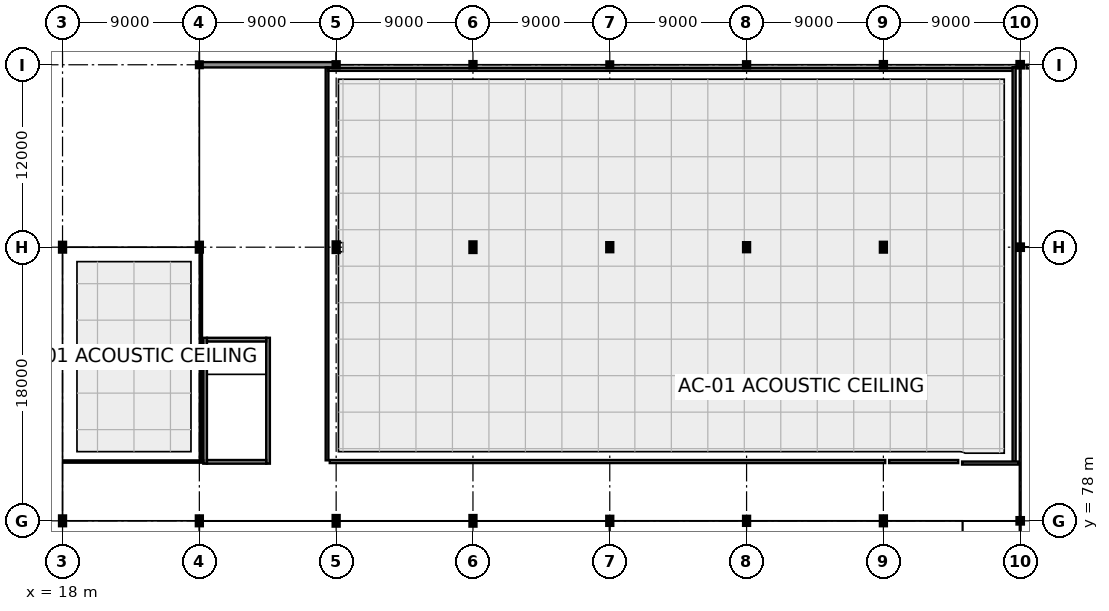
"""IFC4 building model, lengths in metres.
Left out: names, types, materials, properties, quantities, classifications, styles, units other than length and angle.
Written with IfcOpenShell. Run it as: python <this file> out.ifc"""

import sys

from ifc_helpers import new_model, si_unit, direction, frame, frame_2d, origin, origin_2d, place, context, subcontext, project, spatial, rectangle, hollow_circle, i_section, extrude, element, fill, save


model = new_model("IFC4")
c1 = context("Model", 3, precision=1e-05, world=origin(), true_north=direction((0.0, 1.0)))
c2 = subcontext(c1, "Body", "Model", "MODEL_VIEW")
j1 = project(units=[si_unit("LENGTHUNIT", "METRE"), si_unit("PLANEANGLEUNIT", "RADIAN")], contexts=[c1])
p1 = place(None, origin())
s1 = spatial("IfcSite", under=j1, at=p1, CompositionType="ELEMENT")
p2 = place(p1, origin())
s2 = spatial("IfcBuilding", under=s1, at=p2, CompositionType="ELEMENT")
p3 = place(p2, origin())
s3 = spatial("IfcBuildingStorey", under=s2, at=p3, CompositionType="ELEMENT", Elevation=0.0)
for number, where, z_axis, x_axis in (
    (1, (18.0, 78.0, 0.0), (0.0, 0.0, 1.0), (0.0, 1.0, 0.0)),
    (2, (18.0, 96.0, 0.0), (0.0, 0.0, 1.0), (1.0, 0.0, 0.0)),
    (3, (27.0, 78.0, 0.0), (0.0, 0.0, 1.0), (1.0, 0.0, 0.0)),
    (4, (27.0, 96.0, 0.0), (0.0, 0.0, 1.0), (1.0, 0.0, 0.0)),
):
    element("IfcColumn", number, at=place(p3, frame(where, z_axis=z_axis, x_axis=x_axis)), inside=s3, PredefinedType="COLUMN", context=c2, shape_type="SweptSolid", body=[
        extrude(i_section(OverallWidth=0.3, OverallDepth=0.55, WebThickness=0.015, FlangeThickness=0.029, at=origin_2d()), origin(), (0.0, 0.0, 1.0), 5.4),
    ])
p4 = place(p3, frame((27.0, 108.0, 0.0), z_axis=(0.0, 0.0, 1.0), x_axis=(1.0, 0.0, 0.0)))
e5 = element("IfcColumn", 5, at=p4, inside=s3, PredefinedType="COLUMN", context=c2, shape_type="SweptSolid", body=[
    extrude(i_section(OverallWidth=0.28, OverallDepth=0.28, WebThickness=0.01, FlangeThickness=0.018, at=origin_2d()), origin(), (0.0, 0.0, 1.0), 5.4),
])
for number, where, z_axis, x_axis in (
    (6, (36.0, 78.0, 0.0), (0.0, 0.0, 1.0), (1.0, 0.0, 0.0)),
    (7, (36.0, 96.0, 0.0), (0.0, 0.0, 1.0), (0.0, 1.0, 0.0)),
):
    element("IfcColumn", number, at=place(p3, frame(where, z_axis=z_axis, x_axis=x_axis)), inside=s3, PredefinedType="COLUMN", context=c2, shape_type="SweptSolid", body=[
        extrude(i_section(OverallWidth=0.3, OverallDepth=0.6, WebThickness=0.015, FlangeThickness=0.03, at=origin_2d()), origin(), (0.0, 0.0, 1.0), 5.4),
    ])
p5 = place(p3, frame((36.0, 108.0, 0.0), z_axis=(0.0, 0.0, 1.0), x_axis=(1.0, 0.0, 0.0)))
e8 = element("IfcColumn", 8, at=p5, inside=s3, PredefinedType="COLUMN", context=c2, shape_type="SweptSolid", body=[
    extrude(i_section(OverallWidth=0.3, OverallDepth=0.3, WebThickness=0.011, FlangeThickness=0.019, at=origin_2d()), origin(), (0.0, 0.0, 1.0), 5.4),
])
for number, where, z_axis, x_axis in (
    (9, (45.0, 78.0, 0.0), (0.0, 0.0, 1.0), (1.0, 0.0, 0.0)),
    (10, (45.0, 96.0, 0.0), (0.0, 0.0, 1.0), (1.0, 0.0, 0.0)),
):
    element("IfcColumn", number, at=place(p3, frame(where, z_axis=z_axis, x_axis=x_axis)), inside=s3, PredefinedType="COLUMN", context=c2, shape_type="SweptSolid", body=[
        extrude(i_section(OverallWidth=0.3, OverallDepth=0.6, WebThickness=0.015, FlangeThickness=0.03, at=origin_2d()), origin(), (0.0, 0.0, 1.0), 5.4),
    ])
p6 = place(p3, frame((45.0, 108.0, 0.0), z_axis=(0.0, 0.0, 1.0), x_axis=(1.0, 0.0, 0.0)))
e11 = element("IfcColumn", 11, at=p6, inside=s3, PredefinedType="COLUMN", context=c2, shape_type="SweptSolid", body=[
    extrude(i_section(OverallWidth=0.3, OverallDepth=0.32, WebThickness=0.011, FlangeThickness=0.021, at=origin_2d()), origin(), (0.0, 0.0, 1.0), 5.4),
])
for number, where, z_axis, x_axis in (
    (12, (54.0, 78.0, 0.0), (0.0, 0.0, 1.0), (1.0, 0.0, 0.0)),
    (13, (54.0, 96.0, 0.0), (0.0, 0.0, 1.0), (1.0, 0.0, 0.0)),
):
    element("IfcColumn", number, at=place(p3, frame(where, z_axis=z_axis, x_axis=x_axis)), inside=s3, PredefinedType="COLUMN", context=c2, shape_type="SweptSolid", body=[
        extrude(i_section(OverallWidth=0.3, OverallDepth=0.5, WebThickness=0.014, FlangeThickness=0.028, at=origin_2d()), origin(), (0.0, 0.0, 1.0), 5.4),
    ])
p7 = place(p3, frame((54.0, 108.0, 0.0), z_axis=(0.0, 0.0, 1.0), x_axis=(1.0, 0.0, 0.0)))
e14 = element("IfcColumn", 14, at=p7, inside=s3, PredefinedType="COLUMN", context=c2, shape_type="SweptSolid", body=[
    extrude(i_section(OverallWidth=0.28, OverallDepth=0.28, WebThickness=0.01, FlangeThickness=0.018, at=origin_2d()), origin(), (0.0, 0.0, 1.0), 5.4),
])
for number, where, z_axis, x_axis in (
    (15, (63.0, 78.0, 0.0), (0.0, 0.0, 1.0), (0.0, 1.0, 0.0)),
    (16, (63.0, 96.0, 0.0), (0.0, 0.0, 1.0), (1.0, 0.0, 0.0)),
):
    element("IfcColumn", number, at=place(p3, frame(where, z_axis=z_axis, x_axis=x_axis)), inside=s3, PredefinedType="COLUMN", context=c2, shape_type="SweptSolid", body=[
        extrude(i_section(OverallWidth=0.3, OverallDepth=0.5, WebThickness=0.014, FlangeThickness=0.028, at=origin_2d()), origin(), (0.0, 0.0, 1.0), 5.4),
    ])
p8 = place(p3, frame((63.0, 108.0, 0.0), z_axis=(0.0, 0.0, 1.0), x_axis=(0.0, 1.0, 0.0)))
e17 = element("IfcColumn", 17, at=p8, inside=s3, PredefinedType="COLUMN", context=c2, shape_type="SweptSolid", body=[
    extrude(i_section(OverallWidth=0.3, OverallDepth=0.3, WebThickness=0.011, FlangeThickness=0.019, at=origin_2d()), origin(), (0.0, 0.0, 1.0), 5.4),
])
for number, where, z_axis, x_axis in (
    (18, (72.0, 78.0, 0.0), (0.0, 0.0, 1.0), (1.0, 0.0, 0.0)),
    (19, (72.0, 96.0, 0.0), (0.0, 0.0, 1.0), (1.0, 0.0, 0.0)),
):
    element("IfcColumn", number, at=place(p3, frame(where, z_axis=z_axis, x_axis=x_axis)), inside=s3, PredefinedType="COLUMN", context=c2, shape_type="SweptSolid", body=[
        extrude(i_section(OverallWidth=0.3, OverallDepth=0.55, WebThickness=0.015, FlangeThickness=0.029, at=origin_2d()), origin(), (0.0, 0.0, 1.0), 5.4),
    ])
p9 = place(p3, frame((72.0, 108.0, 0.0), z_axis=(0.0, 0.0, 1.0), x_axis=(1.0, 0.0, 0.0)))
e20 = element("IfcColumn", 20, at=p9, inside=s3, PredefinedType="COLUMN", context=c2, shape_type="SweptSolid", body=[
    extrude(i_section(OverallWidth=0.3, OverallDepth=0.32, WebThickness=0.011, FlangeThickness=0.021, at=origin_2d()), origin(), (0.0, 0.0, 1.0), 5.4),
])
for number, where, z_axis, x_axis in (
    (21, (81.0, 78.0, 0.0), (0.0, 0.0, 1.0), (1.0, 0.0, 0.0)),
    (22, (81.0, 96.0, 0.0), (0.0, 0.0, 1.0), (1.0, 0.0, 0.0)),
    (23, (81.0, 108.0, 0.0), (0.0, 0.0, 1.0), (1.0, 0.0, 0.0)),
):
    element("IfcColumn", number, at=place(p3, frame(where, z_axis=z_axis, x_axis=x_axis)), inside=s3, PredefinedType="PILASTER", context=c2, shape_type="SweptSolid", body=[
        extrude(hollow_circle(Radius=0.162, WallThickness=0.012, at=origin_2d()), origin(), (0.0, 0.0, 1.0), 5.4),
    ])
p10 = place(p3, frame((35.992, 108.0, 0.0), z_axis=(0.0, 0.0, 1.0), x_axis=(-1.0, 0.0, 0.0)))
e24 = element("IfcWall", 24, at=p10, inside=s3, PredefinedType="SOLIDWALL", context=c2, shape_type="SweptSolid", body=[
    extrude(rectangle(XDim=8.984, YDim=0.35, at=frame_2d((4.492, 0.0))), origin(), (0.0, 0.0, 1.0), 4.535),
])
p11 = place(p10, frame((1.892, 0.0, 0.0)))
e25 = element("IfcOpeningElement", 25, at=p11, cuts=e24, PredefinedType="OPENING", context=c2, shape_type="SweptSolid", body=[
    extrude(rectangle(XDim=1.8, YDim=2.4, at=frame_2d((0.9, 1.2))), frame((0.0, 0.19, 0.0), z_axis=(0.0, -1.0, 0.0), x_axis=(1.0, 0.0, 0.0)), (0.0, 0.0, 1.0), 0.38),
])
p12 = place(p3, frame((81.42, 107.88, 0.0), z_axis=(0.0, 0.0, 1.0), x_axis=(1.0, 0.0, 0.0)))
e26 = element("IfcWall", 26, at=p12, inside=s3, PredefinedType="PARAPET", context=c2, shape_type="SweptSolid", body=[
    extrude(rectangle(XDim=8.52, YDim=0.24, at=frame_2d((4.26, 0.0))), origin(), (0.0, 0.0, 1.0), 0.9),
])
p13 = place(p3, frame((27.38, 81.76, 0.0), z_axis=(0.0, 0.0, 1.0), x_axis=(0.0, 1.0, 0.0)))
e27 = element("IfcWall", 27, at=p13, inside=s3, PredefinedType="SHEAR", context=c2, shape_type="SweptSolid", body=[
    extrude(rectangle(XDim=8.28, YDim=0.24, at=frame_2d((4.14, 0.0))), origin(), (0.0, 0.0, 1.0), 5.21),
])
p14 = place(p3, frame((31.52, 81.76, 0.0), z_axis=(0.0, 0.0, 1.0), x_axis=(0.0, 1.0, 0.0)))
e28 = element("IfcWall", 28, at=p14, inside=s3, PredefinedType="SHEAR", context=c2, shape_type="SweptSolid", body=[
    extrude(rectangle(XDim=8.28, YDim=0.24, at=frame_2d((4.14, 0.0))), origin(), (0.0, 0.0, 1.0), 5.21),
])
p15 = place(p14, frame((0.49, 0.0, 0.0)))
e29 = element("IfcOpeningElement", 29, at=p15, cuts=e28, PredefinedType="OPENING", context=c2, shape_type="SweptSolid", body=[
    extrude(rectangle(XDim=1.3, YDim=2.2, at=frame_2d((0.65, 1.1))), frame((0.0, 0.135, 0.0), z_axis=(0.0, -1.0, 0.0), x_axis=(1.0, 0.0, 0.0)), (0.0, 0.0, 1.0), 0.27),
])
for number, where, z_axis, x_axis in (
    (30, (27.5, 81.88, 0.0), (0.0, 0.0, 1.0), (1.0, 0.0, 0.0)),
    (31, (27.5, 89.92, 0.0), (0.0, 0.0, 1.0), (1.0, 0.0, 0.0)),
):
    element("IfcWall", number, at=place(p3, frame(where, z_axis=z_axis, x_axis=x_axis)), inside=s3, PredefinedType="SHEAR", context=c2, shape_type="SweptSolid", body=[
        extrude(rectangle(XDim=3.9, YDim=0.24, at=frame_2d((1.95, 0.0))), origin(), (0.0, 0.0, 1.0), 5.21),
    ])
p16 = place(p3, frame((35.4, 107.83, 0.0), z_axis=(0.0, 0.0, 1.0), x_axis=(0.0, -1.0, 0.0)))
e32 = element("IfcWall", 32, at=p16, inside=s3, PredefinedType="PARTITIONING", context=c2, shape_type="SweptSolid", body=[
    extrude(rectangle(XDim=25.85, YDim=0.18, at=frame_2d((12.925, 0.0))), origin(), (0.0, 0.0, 1.0), 5.04),
])
p17 = place(p3, frame((76.92, 81.9, 0.0), z_axis=(0.0, 0.0, 1.0), x_axis=(-1.0, 0.0, 0.0)))
e33 = element("IfcWall", 33, at=p17, inside=s3, PredefinedType="PARTITIONING", context=c2, shape_type="SweptSolid", body=[
    extrude(rectangle(XDim=4.54, YDim=0.2, at=frame_2d((2.27, 0.0))), origin(), (0.0, 0.0, 1.0), 5.04),
])
p18 = place(p3, frame((72.12, 81.9, 0.0), z_axis=(0.0, 0.0, 1.0), x_axis=(-1.0, 0.0, 0.0)))
e34 = element("IfcWall", 34, at=p18, inside=s3, PredefinedType="PARTITIONING", context=c2, shape_type="SweptSolid", body=[
    extrude(rectangle(XDim=36.54, YDim=0.2, at=frame_2d((18.27, 0.0))), origin(), (0.0, 0.0, 1.0), 5.04),
])
p19 = place(p18, frame((17.32, 0.0, 0.0)))
e35 = element("IfcOpeningElement", 35, at=p19, cuts=e34, PredefinedType="OPENING", context=c2, shape_type="SweptSolid", body=[
    extrude(rectangle(XDim=1.9, YDim=2.5, at=frame_2d((0.95, 1.25))), frame((0.0, 0.115, 0.0), z_axis=(0.0, -1.0, 0.0), x_axis=(1.0, 0.0, 0.0)), (0.0, 0.0, 1.0), 0.23),
])
p20 = place(p18, frame((34.19, 0.0, 1.05)))
e36 = element("IfcOpeningElement", 36, at=p20, cuts=e34, PredefinedType="OPENING", context=c2, shape_type="SweptSolid", body=[
    extrude(rectangle(XDim=1.5, YDim=1.1, at=frame_2d((0.75, 0.55))), frame((0.0, 0.115, 0.0), z_axis=(0.0, -1.0, 0.0), x_axis=(1.0, 0.0, 0.0)), (0.0, 0.0, 1.0), 0.23),
])
p21 = place(p3, frame((35.485, 107.7, 0.0), z_axis=(0.0, 0.0, 1.0), x_axis=(1.0, 0.0, 0.0)))
e37 = element("IfcWall", 37, at=p21, inside=s3, PredefinedType="PARTITIONING", context=c2, shape_type="SweptSolid", body=[
    extrude(rectangle(XDim=45.035, YDim=0.2, at=frame_2d((22.518, 0.0))), origin(), (0.0, 0.0, 1.0), 5.04),
])
p22 = place(p3, frame((80.6, 107.842, 0.0), z_axis=(0.0, 0.0, 1.0), x_axis=(0.0, -1.0, 0.0)))
e38 = element("IfcWall", 38, at=p22, inside=s3, PredefinedType="PARTITIONING", context=c2, shape_type="SweptSolid", body=[
    extrude(rectangle(XDim=25.962, YDim=0.2, at=frame_2d((12.981, 0.0))), origin(), (0.0, 0.0, 1.0), 5.04),
])
p23 = place(p3, frame((80.875, 81.8, 0.0), z_axis=(0.0, 0.0, 1.0), x_axis=(-1.0, 0.0, 0.0)))
e39 = element("IfcWall", 39, at=p23, inside=s3, PredefinedType="PARTITIONING", context=c2, shape_type="SweptSolid", body=[
    extrude(rectangle(XDim=3.695, YDim=0.2, at=frame_2d((1.848, 0.0))), origin(), (0.0, 0.0, 1.0), 5.04),
])
p24 = place(p3, frame((27.1, 95.62, 0.0), z_axis=(0.0, 0.0, 1.0), x_axis=(0.0, -1.0, 0.0)))
e40 = element("IfcWall", 40, at=p24, inside=s3, PredefinedType="PARTITIONING", context=c2, shape_type="SweptSolid", body=[
    extrude(rectangle(XDim=13.64, YDim=0.15, at=frame_2d((6.82, 0.0))), origin(), (0.0, 0.0, 1.0), 4.275),
])
p25 = place(p3, frame((27.265, 81.9, 0.0), z_axis=(0.0, 0.0, 1.0), x_axis=(-1.0, 0.0, 0.0)))
e41 = element("IfcWall", 41, at=p25, inside=s3, PredefinedType="PARTITIONING", context=c2, shape_type="SweptSolid", body=[
    extrude(rectangle(XDim=9.19, YDim=0.15, at=frame_2d((4.595, 0.0))), origin(), (0.0, 0.0, 1.0), 5.04),
])
p26 = place(p25, frame((4.07, 0.0, 0.0)))
e42 = element("IfcOpeningElement", 42, at=p26, cuts=e41, PredefinedType="OPENING", context=c2, shape_type="SweptSolid", body=[
    extrude(rectangle(XDim=1.05, YDim=2.25, at=frame_2d((0.525, 1.125))), frame((0.0, 0.09, 0.0), z_axis=(0.0, -1.0, 0.0), x_axis=(1.0, 0.0, 0.0)), (0.0, 0.0, 1.0), 0.18),
])
p27 = place(p25, frame((7.14, 0.0, 1.05)))
e43 = element("IfcOpeningElement", 43, at=p27, cuts=e41, PredefinedType="OPENING", context=c2, shape_type="SweptSolid", body=[
    extrude(rectangle(XDim=1.2, YDim=1.0, at=frame_2d((0.6, 0.5))), frame((0.0, 0.09, 0.0), z_axis=(0.0, -1.0, 0.0), x_axis=(1.0, 0.0, 0.0)), (0.0, 0.0, 1.0), 0.18),
])
p28 = place(p11, frame((1.8, 0.0, 0.0), z_axis=(0.0, 0.0, 1.0), x_axis=(-1.0, 0.0, 0.0)))
e44 = element("IfcDoor", 44, at=p28, inside=s3, OperationType="DOUBLE_DOOR_SINGLE_SWING", PredefinedType="DOOR", context=c2, shape_type="SweptSolid", body=[
    extrude(rectangle(XDim=1.8, YDim=2.4, at=frame_2d((0.9, 1.2))), frame((0.0, 0.025, 0.0), z_axis=(0.0, -1.0, 0.0), x_axis=(1.0, 0.0, 0.0)), (0.0, 0.0, 1.0), 0.05),
])
fill(e25, e44)
p29 = place(p15, frame((1.3, 0.0, 0.0), z_axis=(0.0, 0.0, 1.0), x_axis=(-1.0, 0.0, 0.0)))
e45 = element("IfcDoor", 45, at=p29, inside=s3, OperationType="SINGLE_SWING_LEFT", PredefinedType="DOOR", context=c2, shape_type="SweptSolid", body=[
    extrude(rectangle(XDim=1.3, YDim=2.2, at=frame_2d((0.65, 1.1))), frame((0.0, 0.025, 0.0), z_axis=(0.0, -1.0, 0.0), x_axis=(1.0, 0.0, 0.0)), (0.0, 0.0, 1.0), 0.05),
])
fill(e29, e45)
p30 = place(p19, origin())
e46 = element("IfcDoor", 46, at=p30, inside=s3, OperationType="DOUBLE_DOOR_SINGLE_SWING", PredefinedType="DOOR", context=c2, shape_type="SweptSolid", body=[
    extrude(rectangle(XDim=1.9, YDim=2.5, at=frame_2d((0.95, 1.25))), frame((0.0, 0.025, 0.0), z_axis=(0.0, -1.0, 0.0), x_axis=(1.0, 0.0, 0.0)), (0.0, 0.0, 1.0), 0.05),
])
fill(e35, e46)
p31 = place(p20, origin())
e47 = element("IfcWindow", 47, at=p31, inside=s3, PartitioningType="SINGLE_PANEL", PredefinedType="WINDOW", context=c2, shape_type="SweptSolid", body=[
    extrude(rectangle(XDim=1.5, YDim=1.1, at=frame_2d((0.75, 0.55))), frame((0.0, 0.03, 0.0), z_axis=(0.0, -1.0, 0.0), x_axis=(1.0, 0.0, 0.0)), (0.0, 0.0, 1.0), 0.06),
])
fill(e36, e47)
p32 = place(p26, frame((1.05, 0.0, 0.0), z_axis=(0.0, 0.0, 1.0), x_axis=(-1.0, 0.0, 0.0)))
e48 = element("IfcDoor", 48, at=p32, inside=s3, OperationType="SINGLE_SWING_LEFT", PredefinedType="DOOR", context=c2, shape_type="SweptSolid", body=[
    extrude(rectangle(XDim=1.05, YDim=2.25, at=frame_2d((0.525, 1.125))), frame((0.0, 0.025, 0.0), z_axis=(0.0, -1.0, 0.0), x_axis=(1.0, 0.0, 0.0)), (0.0, 0.0, 1.0), 0.05),
])
fill(e42, e48)
p33 = place(p27, origin())
e49 = element("IfcWindow", 49, at=p33, inside=s3, PartitioningType="SINGLE_PANEL", PredefinedType="WINDOW", context=c2, shape_type="SweptSolid", body=[
    extrude(rectangle(XDim=1.2, YDim=1.0, at=frame_2d((0.6, 0.5))), frame((0.0, 0.03, 0.0), z_axis=(0.0, -1.0, 0.0), x_axis=(1.0, 0.0, 0.0)), (0.0, 0.0, 1.0), 0.06),
])
fill(e43, e49)
save(model, sys.argv[1])
